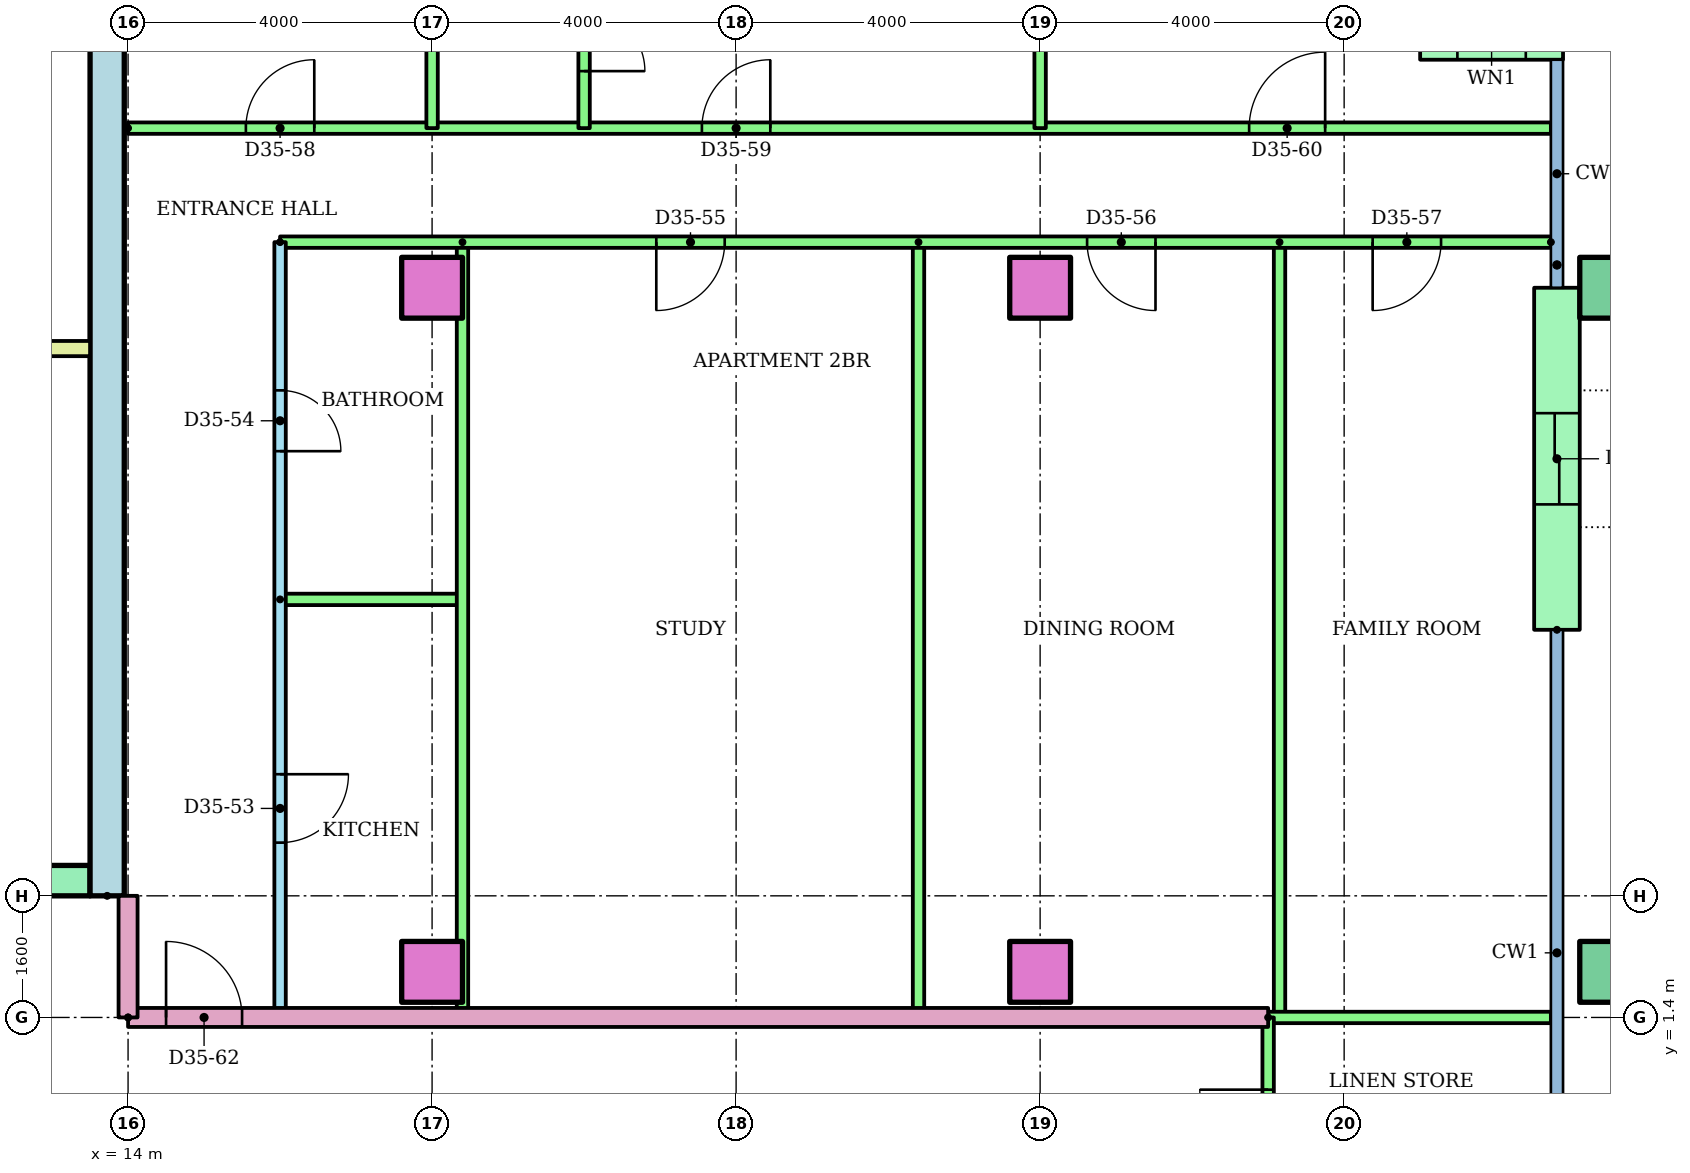
"""IFC4 building model, lengths in metres.
Left out: names, types, materials, properties, quantities, classifications, styles, units other than length and angle.
Written with IfcOpenShell. Run it as: python <this file> out.ifc"""

import sys

from ifc_helpers import new_model, si_unit, direction, frame, frame_2d, origin, origin_2d, place, context, subcontext, project, spatial, rectangle, hollow_rectangle, extrude, element, fill, save


model = new_model("IFC4")
c1 = context("Model", 3, precision=1e-05, world=origin(), true_north=direction((0.0, 1.0)))
c2 = subcontext(c1, "Body", "Model", "MODEL_VIEW")
j1 = project(units=[si_unit("LENGTHUNIT", "METRE"), si_unit("PLANEANGLEUNIT", "RADIAN")], contexts=[c1])
p1 = place(None, origin())
s1 = spatial("IfcSite", under=j1, at=p1, CompositionType="ELEMENT")
p2 = place(p1, origin())
s2 = spatial("IfcBuilding", under=s1, at=p2, CompositionType="ELEMENT")
p3 = place(p2, frame((0.0, 0.0, 135.8)))
s3 = spatial("IfcBuildingStorey", under=s2, at=p3, CompositionType="ELEMENT", Elevation=135.8)
for number, where in (
    (1, (18.0, 2.0, 0.0)),
    (2, (26.0, 2.0, 0.0)),
):
    element("IfcColumn", number, at=place(p3, frame(where)), inside=s3, PredefinedType="COLUMN", context=c2, shape_type="SweptSolid", body=[
        extrude(rectangle(XDim=0.8, YDim=0.8, at=origin_2d()), origin(), (0.0, 0.0, 1.0), 3.2),
    ])
p4 = place(p3, frame((33.5, 2.0, 0.0)))
e3 = element("IfcColumn", 3, at=p4, inside=s3, PredefinedType="COLUMN", context=c2, shape_type="SweptSolid", body=[
    extrude(hollow_rectangle(XDim=0.8, YDim=0.8, WallThickness=0.04, at=origin_2d()), origin(), (0.0, 0.0, 1.0), 3.2),
])
for number, where in (
    (4, (18.0, 11.0, 0.0)),
    (5, (26.0, 11.0, 0.0)),
):
    element("IfcColumn", number, at=place(p3, frame(where)), inside=s3, PredefinedType="COLUMN", context=c2, shape_type="SweptSolid", body=[
        extrude(rectangle(XDim=0.8, YDim=0.8, at=origin_2d()), origin(), (0.0, 0.0, 1.0), 3.2),
    ])
p5 = place(p3, frame((33.5, 11.0, 0.0)))
e6 = element("IfcColumn", 6, at=p5, inside=s3, PredefinedType="COLUMN", context=c2, shape_type="SweptSolid", body=[
    extrude(hollow_rectangle(XDim=0.8, YDim=0.8, WallThickness=0.04, at=origin_2d()), origin(), (0.0, 0.0, 1.0), 3.2),
])
p6 = place(p3, frame((32.88, 14.3, 0.0), z_axis=(0.0, 0.0, 1.0), x_axis=(-1.0, 0.0, 0.0)))
e7 = element("IfcWall", 7, at=p6, inside=s3, PredefinedType="STANDARD", context=c2, shape_type="SweptSolid", body=[
    extrude(rectangle(XDim=1.88, YDim=0.6, at=frame_2d((0.94, 0.0))), origin(), (0.0, 0.0, 1.0), 2.92),
])
p7 = place(p6, frame((0.49, 0.0, 0.9)))
e8 = element("IfcOpeningElement", 8, at=p7, cuts=e7, PredefinedType="OPENING", context=c2, shape_type="SweptSolid", body=[
    extrude(rectangle(XDim=0.9, YDim=1.5, at=frame_2d((0.45, 0.75))), frame((0.0, 0.31, 0.0), z_axis=(0.0, -1.0, 0.0), x_axis=(1.0, 0.0, 0.0)), (0.0, 0.0, 1.0), 0.62),
])
p8 = place(p3, frame((32.8, 6.5, 0.0), z_axis=(0.0, 0.0, 1.0), x_axis=(0.0, 1.0, 0.0)))
e9 = element("IfcWall", 9, at=p8, inside=s3, PredefinedType="STANDARD", context=c2, shape_type="SweptSolid", body=[
    extrude(rectangle(XDim=4.5, YDim=0.6, at=frame_2d((2.25, 0.0))), origin(), (0.0, 0.0, 1.0), 2.92),
])
p9 = place(p8, frame((1.65, 0.0, 0.0)))
e10 = element("IfcOpeningElement", 10, at=p9, cuts=e9, PredefinedType="OPENING", context=c2, shape_type="SweptSolid", body=[
    extrude(rectangle(XDim=1.2, YDim=2.1, at=frame_2d((0.6, 1.05))), frame((0.0, 0.31, 0.0), z_axis=(0.0, -1.0, 0.0), x_axis=(1.0, 0.0, 0.0)), (0.0, 0.0, 1.0), 0.62),
])
p10 = place(p3, frame((13.725, 3.0, 0.0), z_axis=(0.0, 0.0, 1.0), x_axis=(0.0, 1.0, 0.0)))
e11 = element("IfcWall", 11, at=p10, inside=s3, PredefinedType="SHEAR", context=c2, shape_type="SweptSolid", body=[
    extrude(rectangle(XDim=17.0, YDim=0.45, at=frame_2d((8.5, 0.0))), origin(), (0.0, 0.0, 1.0), 2.92),
])
p11 = place(p3, frame((-13.5, 3.2, 0.0)))
e12 = element("IfcWall", 12, at=p11, inside=s3, PredefinedType="SHEAR", context=c2, shape_type="SweptSolid", body=[
    extrude(rectangle(XDim=27.0, YDim=0.4, at=frame_2d((13.5, 0.0))), origin(), (0.0, 0.0, 1.0), 2.92),
])
p12 = place(p11, frame((6.861, 0.0, 0.0)))
e13 = element("IfcOpeningElement", 13, at=p12, cuts=e12, PredefinedType="OPENING", context=c2, shape_type="SweptSolid", body=[
    extrude(rectangle(XDim=1.1, YDim=2.1, at=frame_2d((0.55, 1.05))), frame((0.0, 0.21, 0.0), z_axis=(0.0, -1.0, 0.0), x_axis=(1.0, 0.0, 0.0)), (0.0, 0.0, 1.0), 0.42),
])
p13 = place(p11, frame((9.906, 0.0, 0.0)))
e14 = element("IfcOpeningElement", 14, at=p13, cuts=e12, PredefinedType="OPENING", context=c2, shape_type="SweptSolid", body=[
    extrude(rectangle(XDim=1.1, YDim=2.1, at=frame_2d((0.55, 1.05))), frame((0.0, 0.21, 0.0), z_axis=(0.0, -1.0, 0.0), x_axis=(1.0, 0.0, 0.0)), (0.0, 0.0, 1.0), 0.42),
])
p14 = place(p11, frame((15.994, 0.0, 0.0)))
e15 = element("IfcOpeningElement", 15, at=p14, cuts=e12, PredefinedType="OPENING", context=c2, shape_type="SweptSolid", body=[
    extrude(rectangle(XDim=1.1, YDim=2.1, at=frame_2d((0.55, 1.05))), frame((0.0, 0.21, 0.0), z_axis=(0.0, -1.0, 0.0), x_axis=(1.0, 0.0, 0.0)), (0.0, 0.0, 1.0), 0.42),
])
p15 = place(p11, frame((19.039, 0.0, 0.0)))
e16 = element("IfcOpeningElement", 16, at=p15, cuts=e12, PredefinedType="OPENING", context=c2, shape_type="SweptSolid", body=[
    extrude(rectangle(XDim=1.1, YDim=2.1, at=frame_2d((0.55, 1.05))), frame((0.0, 0.21, 0.0), z_axis=(0.0, -1.0, 0.0), x_axis=(1.0, 0.0, 0.0)), (0.0, 0.0, 1.0), 0.42),
])
p16 = place(p11, frame((12.6, 0.0, 0.0)))
e17 = element("IfcOpeningElement", 17, at=p16, cuts=e12, PredefinedType="OPENING", context=c2, shape_type="SweptSolid", body=[
    extrude(rectangle(XDim=1.8, YDim=2.1, at=frame_2d((0.9, 1.05))), frame((0.0, 0.21, 0.0), z_axis=(0.0, -1.0, 0.0), x_axis=(1.0, 0.0, 0.0)), (0.0, 0.0, 1.0), 0.42),
])
p17 = place(p3, frame((9.6, 10.2, 0.0)))
e18 = element("IfcWall", 18, at=p17, inside=s3, PredefinedType="PARTITIONING", context=c2, shape_type="SweptSolid", body=[
    extrude(rectangle(XDim=3.9, YDim=0.2, at=frame_2d((1.95, 0.0))), origin(), (0.0, 0.0, 1.0), 2.92),
])
p18 = place(p3, frame((16.0, 11.6, 0.0), z_axis=(0.0, 0.0, 1.0), x_axis=(0.0, -1.0, 0.0)))
e19 = element("IfcWall", 19, at=p18, inside=s3, PredefinedType="PARTITIONING", context=c2, shape_type="SweptSolid", body=[
    extrude(rectangle(XDim=10.2, YDim=0.15, at=frame_2d((5.1, 0.0))), origin(), (0.0, 0.0, 1.0), 2.4),
])
p19 = place(p18, frame((7.0, 0.0, 0.0)))
e20 = element("IfcOpeningElement", 20, at=p19, cuts=e19, PredefinedType="OPENING", context=c2, shape_type="SweptSolid", body=[
    extrude(rectangle(XDim=0.9, YDim=2.1, at=frame_2d((0.45, 1.05))), frame((0.0, 0.085, 0.0), z_axis=(0.0, -1.0, 0.0), x_axis=(1.0, 0.0, 0.0)), (0.0, 0.0, 1.0), 0.17),
])
p20 = place(p18, frame((1.95, 0.0, 0.0)))
e21 = element("IfcOpeningElement", 21, at=p20, cuts=e19, PredefinedType="OPENING", context=c2, shape_type="SweptSolid", body=[
    extrude(rectangle(XDim=0.8, YDim=2.1, at=frame_2d((0.4, 1.05))), frame((0.0, 0.085, 0.0), z_axis=(0.0, -1.0, 0.0), x_axis=(1.0, 0.0, 0.0)), (0.0, 0.0, 1.0), 0.17),
])
p21 = place(p3, frame((16.0, 6.9, 0.0)))
e22 = element("IfcWall", 22, at=p21, inside=s3, PredefinedType="PARTITIONING", context=c2, shape_type="SweptSolid", body=[
    extrude(rectangle(XDim=2.4, YDim=0.15, at=frame_2d((1.2, 0.0))), origin(), (0.0, 0.0, 1.0), 2.4),
])
for number, where, z_axis, x_axis in (
    (23, (18.4, 11.6, 0.0), (0.0, 0.0, 1.0), (0.0, -1.0, 0.0)),
    (24, (24.4, 11.6, 0.0), (0.0, 0.0, 1.0), (0.0, -1.0, 0.0)),
    (25, (29.15, 11.6, 0.0), (0.0, 0.0, 1.0), (0.0, -1.0, 0.0)),
):
    element("IfcWall", number, at=place(p3, frame(where, z_axis=z_axis, x_axis=x_axis)), inside=s3, PredefinedType="PARTITIONING", context=c2, shape_type="SweptSolid", body=[
        extrude(rectangle(XDim=10.2, YDim=0.15, at=frame_2d((5.1, 0.0))), origin(), (0.0, 0.0, 1.0), 2.4),
    ])
p22 = place(p3, frame((32.72, 11.6, 0.0), z_axis=(0.0, 0.0, 1.0), x_axis=(-1.0, 0.0, 0.0)))
e26 = element("IfcWall", 26, at=p22, inside=s3, PredefinedType="PARTITIONING", context=c2, shape_type="SweptSolid", body=[
    extrude(rectangle(XDim=16.72, YDim=0.15, at=frame_2d((8.36, 0.0))), origin(), (0.0, 0.0, 1.0), 2.4),
])
p23 = place(p22, frame((10.87, 0.0, 0.0)))
e27 = element("IfcOpeningElement", 27, at=p23, cuts=e26, PredefinedType="OPENING", context=c2, shape_type="SweptSolid", body=[
    extrude(rectangle(XDim=0.9, YDim=2.1, at=frame_2d((0.45, 1.05))), frame((0.0, 0.085, 0.0), z_axis=(0.0, -1.0, 0.0), x_axis=(1.0, 0.0, 0.0)), (0.0, 0.0, 1.0), 0.17),
])
p24 = place(p22, frame((5.202, 0.0, 0.0)))
e28 = element("IfcOpeningElement", 28, at=p24, cuts=e26, PredefinedType="OPENING", context=c2, shape_type="SweptSolid", body=[
    extrude(rectangle(XDim=0.9, YDim=2.1, at=frame_2d((0.45, 1.05))), frame((0.0, 0.085, 0.0), z_axis=(0.0, -1.0, 0.0), x_axis=(1.0, 0.0, 0.0)), (0.0, 0.0, 1.0), 0.17),
])
p25 = place(p22, frame((1.445, 0.0, 0.0)))
e29 = element("IfcOpeningElement", 29, at=p25, cuts=e26, PredefinedType="OPENING", context=c2, shape_type="SweptSolid", body=[
    extrude(rectangle(XDim=0.9, YDim=2.1, at=frame_2d((0.45, 1.05))), frame((0.0, 0.085, 0.0), z_axis=(0.0, -1.0, 0.0), x_axis=(1.0, 0.0, 0.0)), (0.0, 0.0, 1.0), 0.17),
])
p26 = place(p3, frame((14.0, 13.1, 0.0)))
e30 = element("IfcWall", 30, at=p26, inside=s3, PredefinedType="PARTITIONING", context=c2, shape_type="SweptSolid", body=[
    extrude(rectangle(XDim=18.72, YDim=0.15, at=frame_2d((9.36, 0.0))), origin(), (0.0, 0.0, 1.0), 2.4),
])
p27 = place(p26, frame((1.55, 0.0, 0.0)))
e31 = element("IfcOpeningElement", 31, at=p27, cuts=e30, PredefinedType="OPENING", context=c2, shape_type="SweptSolid", body=[
    extrude(rectangle(XDim=0.9, YDim=2.1, at=frame_2d((0.45, 1.05))), frame((0.0, 0.085, 0.0), z_axis=(0.0, -1.0, 0.0), x_axis=(1.0, 0.0, 0.0)), (0.0, 0.0, 1.0), 0.17),
])
p28 = place(p26, frame((7.55, 0.0, 0.0)))
e32 = element("IfcOpeningElement", 32, at=p28, cuts=e30, PredefinedType="OPENING", context=c2, shape_type="SweptSolid", body=[
    extrude(rectangle(XDim=0.9, YDim=2.1, at=frame_2d((0.45, 1.05))), frame((0.0, 0.085, 0.0), z_axis=(0.0, -1.0, 0.0), x_axis=(1.0, 0.0, 0.0)), (0.0, 0.0, 1.0), 0.17),
])
p29 = place(p26, frame((14.75, 0.0, 0.0)))
e33 = element("IfcOpeningElement", 33, at=p29, cuts=e30, PredefinedType="OPENING", context=c2, shape_type="SweptSolid", body=[
    extrude(rectangle(XDim=1.0, YDim=2.1, at=frame_2d((0.5, 1.05))), frame((0.0, 0.085, 0.0), z_axis=(0.0, -1.0, 0.0), x_axis=(1.0, 0.0, 0.0)), (0.0, 0.0, 1.0), 0.17),
])
for number, where, z_axis, x_axis in (
    (34, (18.0, 18.721, 0.0), (0.0, 0.0, 1.0), (0.0, -1.0, 0.0)),
    (35, (26.0, 18.721, 0.0), (0.0, 0.0, 1.0), (0.0, -1.0, 0.0)),
):
    element("IfcWall", number, at=place(p3, frame(where, z_axis=z_axis, x_axis=x_axis)), inside=s3, PredefinedType="PARTITIONING", context=c2, shape_type="SweptSolid", body=[
        extrude(rectangle(XDim=5.621, YDim=0.15, at=frame_2d((2.811, 0.0))), origin(), (0.0, 0.0, 1.0), 2.4),
    ])
p30 = place(p3, frame((20.0, 15.4, 0.0), z_axis=(0.0, 0.0, 1.0), x_axis=(0.0, -1.0, 0.0)))
e36 = element("IfcWall", 36, at=p30, inside=s3, PredefinedType="PARTITIONING", context=c2, shape_type="SweptSolid", body=[
    extrude(rectangle(XDim=2.3, YDim=0.15, at=frame_2d((1.15, 0.0))), origin(), (0.0, 0.0, 1.0), 2.4),
])
p31 = place(p30, frame((0.75, 0.0, 0.0)))
e37 = element("IfcOpeningElement", 37, at=p31, cuts=e36, PredefinedType="OPENING", context=c2, shape_type="SweptSolid", body=[
    extrude(rectangle(XDim=0.8, YDim=2.1, at=frame_2d((0.4, 1.05))), frame((0.0, 0.085, 0.0), z_axis=(0.0, -1.0, 0.0), x_axis=(1.0, 0.0, 0.0)), (0.0, 0.0, 1.0), 0.17),
])
p32 = place(p3, frame((14.0, 1.4, 0.0)))
e38 = element("IfcWall", 38, at=p32, inside=s3, PredefinedType="PARTITIONING", context=c2, shape_type="SweptSolid", body=[
    extrude(rectangle(XDim=15.0, YDim=0.25, at=frame_2d((7.5, 0.0))), origin(), (0.0, 0.0, 1.0), 2.4),
])
p33 = place(p32, frame((0.5, 0.0, 0.0)))
e39 = element("IfcOpeningElement", 39, at=p33, cuts=e38, PredefinedType="OPENING", context=c2, shape_type="SweptSolid", body=[
    extrude(rectangle(XDim=1.0, YDim=2.1, at=frame_2d((0.5, 1.05))), frame((0.0, 0.135, 0.0), z_axis=(0.0, -1.0, 0.0), x_axis=(1.0, 0.0, 0.0)), (0.0, 0.0, 1.0), 0.27),
])
p34 = place(p3, frame((29.0, 1.4, 0.0)))
e40 = element("IfcWall", 40, at=p34, inside=s3, PredefinedType="PARTITIONING", context=c2, shape_type="SweptSolid", body=[
    extrude(rectangle(XDim=3.72, YDim=0.15, at=frame_2d((1.86, 0.0))), origin(), (0.0, 0.0, 1.0), 2.4),
])
p35 = place(p3, frame((29.0, -1.4, 0.0), z_axis=(0.0, 0.0, 1.0), x_axis=(0.0, 1.0, 0.0)))
e41 = element("IfcWall", 41, at=p35, inside=s3, PredefinedType="PARTITIONING", context=c2, shape_type="SweptSolid", body=[
    extrude(rectangle(XDim=2.8, YDim=0.15, at=frame_2d((1.4, 0.0))), origin(), (0.0, 0.0, 1.0), 2.4),
])
p36 = place(p35, frame((0.95, 0.0, 0.0)))
e42 = element("IfcOpeningElement", 42, at=p36, cuts=e41, PredefinedType="OPENING", context=c2, shape_type="SweptSolid", body=[
    extrude(rectangle(XDim=0.9, YDim=2.1, at=frame_2d((0.45, 1.05))), frame((0.0, 0.085, 0.0), z_axis=(0.0, -1.0, 0.0), x_axis=(1.0, 0.0, 0.0)), (0.0, 0.0, 1.0), 0.17),
])
p37 = place(p3, frame((14.0, 1.4, 0.0), z_axis=(0.0, 0.0, 1.0), x_axis=(0.0, 1.0, 0.0)))
e43 = element("IfcWall", 43, at=p37, inside=s3, PredefinedType="PARTITIONING", context=c2, shape_type="SweptSolid", body=[
    extrude(rectangle(XDim=1.6, YDim=0.25, at=frame_2d((0.8, 0.0))), origin(), (0.0, 0.0, 1.0), 2.4),
])
p38 = place(p19, origin())
e44 = element("IfcDoor", 44, at=p38, inside=s3, OperationType="SINGLE_SWING_LEFT", PredefinedType="DOOR", context=c2, shape_type="SweptSolid", body=[
    extrude(rectangle(XDim=0.9, YDim=2.1, at=frame_2d((0.45, 1.05))), frame((0.0, 0.025, 0.0), z_axis=(0.0, -1.0, 0.0), x_axis=(1.0, 0.0, 0.0)), (0.0, 0.0, 1.0), 0.05),
])
fill(e20, e44)
p39 = place(p20, origin())
e45 = element("IfcDoor", 45, at=p39, inside=s3, OperationType="SINGLE_SWING_RIGHT", PredefinedType="DOOR", context=c2, shape_type="SweptSolid", body=[
    extrude(rectangle(XDim=0.8, YDim=2.1, at=frame_2d((0.4, 1.05))), frame((0.0, 0.025, 0.0), z_axis=(0.0, -1.0, 0.0), x_axis=(1.0, 0.0, 0.0)), (0.0, 0.0, 1.0), 0.05),
])
fill(e21, e45)
p40 = place(p23, origin())
e46 = element("IfcDoor", 46, at=p40, inside=s3, OperationType="SINGLE_SWING_RIGHT", PredefinedType="DOOR", context=c2, shape_type="SweptSolid", body=[
    extrude(rectangle(XDim=0.9, YDim=2.1, at=frame_2d((0.45, 1.05))), frame((0.0, 0.025, 0.0), z_axis=(0.0, -1.0, 0.0), x_axis=(1.0, 0.0, 0.0)), (0.0, 0.0, 1.0), 0.05),
])
fill(e27, e46)
p41 = place(p24, origin())
e47 = element("IfcDoor", 47, at=p41, inside=s3, OperationType="SINGLE_SWING_LEFT", PredefinedType="DOOR", context=c2, shape_type="SweptSolid", body=[
    extrude(rectangle(XDim=0.9, YDim=2.1, at=frame_2d((0.45, 1.05))), frame((0.0, 0.025, 0.0), z_axis=(0.0, -1.0, 0.0), x_axis=(1.0, 0.0, 0.0)), (0.0, 0.0, 1.0), 0.05),
])
fill(e28, e47)
p42 = place(p25, origin())
e48 = element("IfcDoor", 48, at=p42, inside=s3, OperationType="SINGLE_SWING_RIGHT", PredefinedType="DOOR", context=c2, shape_type="SweptSolid", body=[
    extrude(rectangle(XDim=0.9, YDim=2.1, at=frame_2d((0.45, 1.05))), frame((0.0, 0.025, 0.0), z_axis=(0.0, -1.0, 0.0), x_axis=(1.0, 0.0, 0.0)), (0.0, 0.0, 1.0), 0.05),
])
fill(e29, e48)
p43 = place(p27, origin())
e49 = element("IfcDoor", 49, at=p43, inside=s3, OperationType="SINGLE_SWING_RIGHT", PredefinedType="DOOR", context=c2, shape_type="SweptSolid", body=[
    extrude(rectangle(XDim=0.9, YDim=2.1, at=frame_2d((0.45, 1.05))), frame((0.0, 0.025, 0.0), z_axis=(0.0, -1.0, 0.0), x_axis=(1.0, 0.0, 0.0)), (0.0, 0.0, 1.0), 0.05),
])
fill(e31, e49)
p44 = place(p28, origin())
e50 = element("IfcDoor", 50, at=p44, inside=s3, OperationType="SINGLE_SWING_RIGHT", PredefinedType="DOOR", context=c2, shape_type="SweptSolid", body=[
    extrude(rectangle(XDim=0.9, YDim=2.1, at=frame_2d((0.45, 1.05))), frame((0.0, 0.025, 0.0), z_axis=(0.0, -1.0, 0.0), x_axis=(1.0, 0.0, 0.0)), (0.0, 0.0, 1.0), 0.05),
])
fill(e32, e50)
p45 = place(p29, origin())
e51 = element("IfcDoor", 51, at=p45, inside=s3, OperationType="SINGLE_SWING_RIGHT", PredefinedType="DOOR", context=c2, shape_type="SweptSolid", body=[
    extrude(rectangle(XDim=1.0, YDim=2.1, at=frame_2d((0.5, 1.05))), frame((0.0, 0.025, 0.0), z_axis=(0.0, -1.0, 0.0), x_axis=(1.0, 0.0, 0.0)), (0.0, 0.0, 1.0), 0.05),
])
fill(e33, e51)
p46 = place(p31, origin())
e52 = element("IfcDoor", 52, at=p46, inside=s3, OperationType="SINGLE_SWING_RIGHT", PredefinedType="DOOR", context=c2, shape_type="SweptSolid", body=[
    extrude(rectangle(XDim=0.8, YDim=2.1, at=frame_2d((0.4, 1.05))), frame((0.0, 0.025, 0.0), z_axis=(0.0, -1.0, 0.0), x_axis=(1.0, 0.0, 0.0)), (0.0, 0.0, 1.0), 0.05),
])
fill(e37, e52)
p47 = place(p33, origin())
e53 = element("IfcDoor", 53, at=p47, inside=s3, OperationType="SINGLE_SWING_LEFT", PredefinedType="DOOR", context=c2, shape_type="SweptSolid", body=[
    extrude(rectangle(XDim=1.0, YDim=2.1, at=frame_2d((0.5, 1.05))), frame((0.0, 0.025, 0.0), z_axis=(0.0, -1.0, 0.0), x_axis=(1.0, 0.0, 0.0)), (0.0, 0.0, 1.0), 0.05),
])
fill(e39, e53)
p48 = place(p36, origin())
e54 = element("IfcDoor", 54, at=p48, inside=s3, OperationType="SINGLE_SWING_RIGHT", PredefinedType="DOOR", context=c2, shape_type="SweptSolid", body=[
    extrude(rectangle(XDim=0.9, YDim=2.1, at=frame_2d((0.45, 1.05))), frame((0.0, 0.025, 0.0), z_axis=(0.0, -1.0, 0.0), x_axis=(1.0, 0.0, 0.0)), (0.0, 0.0, 1.0), 0.05),
])
fill(e42, e54)
p49 = place(p9, origin())
e55 = element("IfcDoor", 55, at=p49, inside=s3, OperationType="SLIDING_TO_LEFT", PredefinedType="DOOR", context=c2, shape_type="SweptSolid", body=[
    extrude(rectangle(XDim=1.2, YDim=2.1, at=frame_2d((0.6, 1.05))), frame((0.0, 0.025, 0.0), z_axis=(0.0, -1.0, 0.0), x_axis=(1.0, 0.0, 0.0)), (0.0, 0.0, 1.0), 0.05),
])
fill(e10, e55)
save(model, sys.argv[1])
